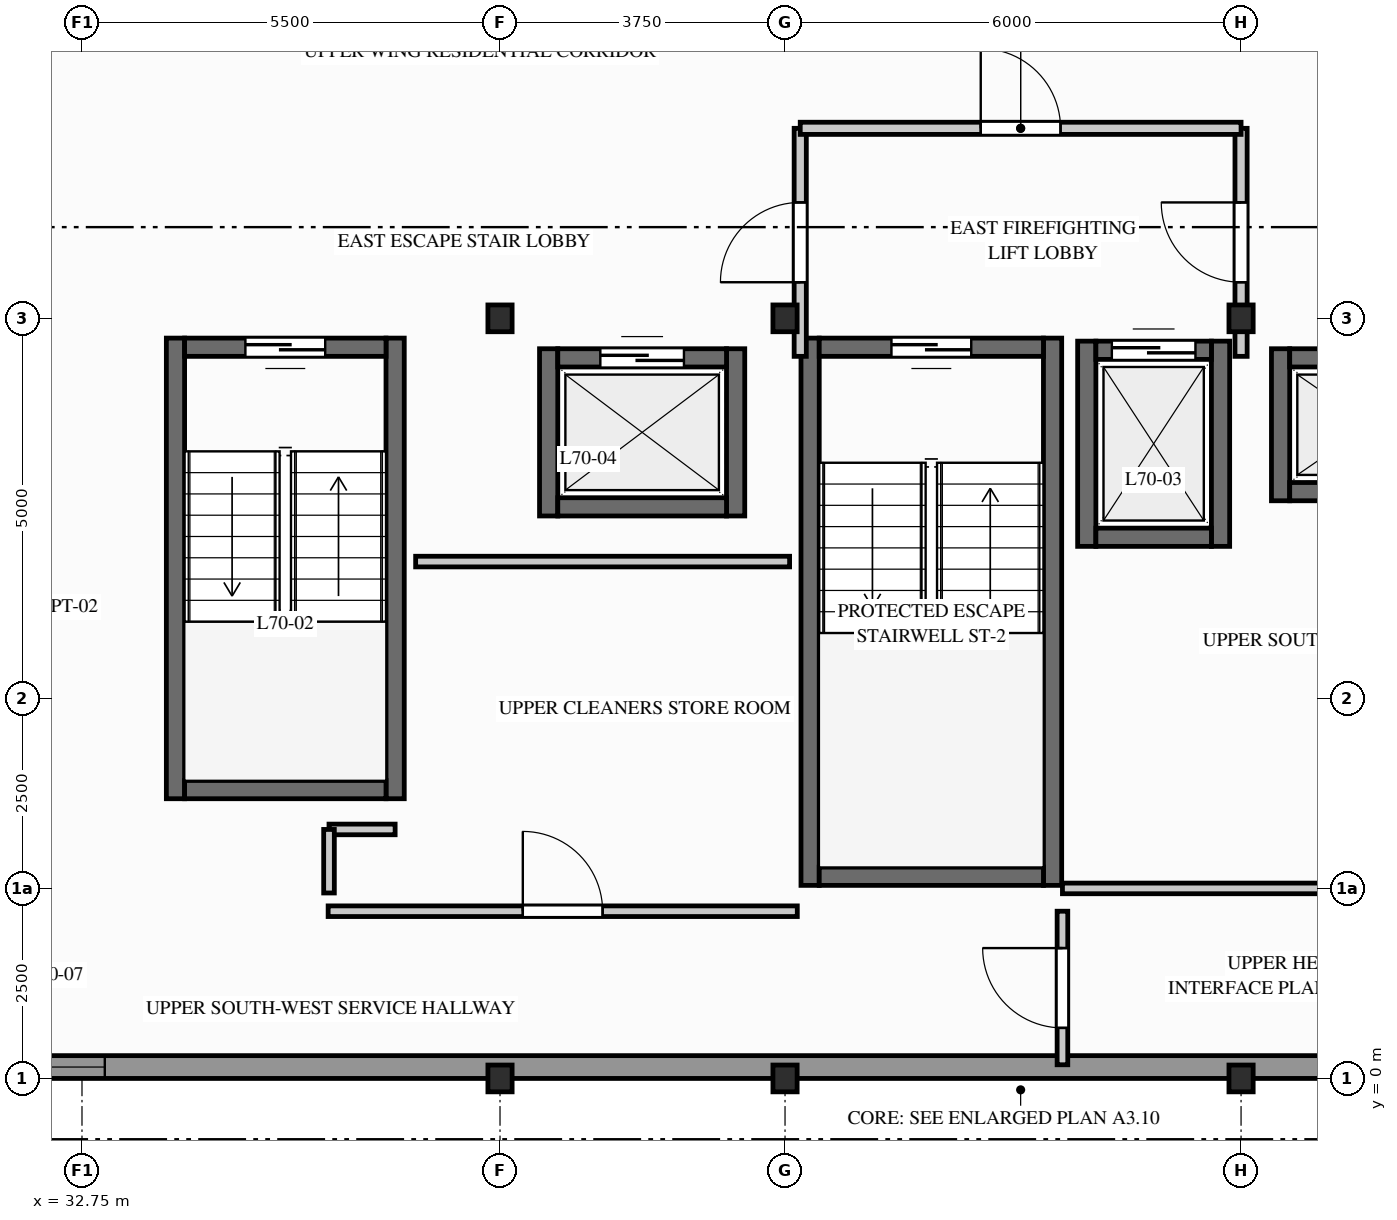
"""IFC4 building model, lengths in metres.
Left out: names, types, materials, properties, quantities, classifications, styles, units other than length and angle.
Written with IfcOpenShell. Run it as: python <this file> out.ifc"""

import sys

from ifc_helpers import new_model, si_unit, direction, frame, frame_2d, origin, origin_2d, place, context, subcontext, project, spatial, rectangle, i_section, extrude, element, fill, save


model = new_model("IFC4")
c1 = context("Model", 3, precision=1e-05, world=origin(), true_north=direction((0.0, 1.0)))
c2 = subcontext(c1, "Body", "Model", "MODEL_VIEW")
j1 = project(units=[si_unit("LENGTHUNIT", "METRE"), si_unit("PLANEANGLEUNIT", "RADIAN")], contexts=[c1])
p1 = place(None, origin())
s1 = spatial("IfcSite", under=j1, at=p1, CompositionType="ELEMENT")
p2 = place(p1, origin())
s2 = spatial("IfcBuilding", under=s1, at=p2, CompositionType="ELEMENT")
p3 = place(p2, frame((0.0, 0.0, 230.4)))
s3 = spatial("IfcBuildingStorey", under=s2, at=p3, CompositionType="ELEMENT", Elevation=230.4)
for number, where, z_axis, x_axis in (
    (1, (38.25, 0.0, 0.0), (0.0, 0.0, 1.0), (1.0, 0.0, 0.0)),
    (2, (38.25, 10.0, 0.0), (0.0, 0.0, 1.0), (1.0, 0.0, 0.0)),
    (3, (42.0, 0.0, 0.0), (0.0, 0.0, 1.0), (1.0, 0.0, 0.0)),
    (4, (42.0, 10.0, 0.0), (0.0, 0.0, 1.0), (1.0, 0.0, 0.0)),
    (5, (48.0, 0.0, 0.0), (0.0, 0.0, 1.0), (1.0, 0.0, 0.0)),
    (6, (48.0, 10.0, 0.0), (0.0, 0.0, 1.0), (1.0, 0.0, 0.0)),
):
    element("IfcColumn", number, at=place(p3, frame(where, z_axis=z_axis, x_axis=x_axis)), inside=s3, PredefinedType="COLUMN", context=c2, shape_type="SweptSolid", body=[
        extrude(i_section(OverallWidth=0.318, OverallDepth=0.353, WebThickness=0.023, FlangeThickness=0.038, FilletRadius=0.015, at=origin_2d()), origin(), (0.0, 0.0, 1.0), 3.1),
    ])
p4 = place(p3, frame((29.75, 0.15, 0.0), z_axis=(0.0, 0.0, 1.0), x_axis=(1.0, 0.0, 0.0)))
e7 = element("IfcWall", 7, at=p4, inside=s3, PredefinedType="STANDARD", context=c2, shape_type="SweptSolid", body=[
    extrude(rectangle(XDim=27.75, YDim=0.3, at=frame_2d((13.875, 0.0))), origin(), (0.0, 0.0, 1.0), 2.332),
])
p5 = place(p4, frame((2.5, 0.0, 0.712)))
e8 = element("IfcOpeningElement", 8, at=p5, cuts=e7, PredefinedType="OPENING", context=c2, shape_type="SweptSolid", body=[
    extrude(rectangle(XDim=0.8, YDim=1.4, at=frame_2d((0.4, 0.7))), frame((0.0, 0.16, 0.0), z_axis=(0.0, -1.0, 0.0), x_axis=(1.0, 0.0, 0.0)), (0.0, 0.0, 1.0), 0.32),
])
p6 = place(p4, frame((19.95, 0.0, 0.312)))
e9 = element("IfcOpeningElement", 9, at=p6, cuts=e7, PredefinedType="OPENING", context=c2, shape_type="SweptSolid", body=[
    extrude(rectangle(XDim=1.5, YDim=1.8, at=frame_2d((0.75, 0.9))), frame((0.0, 0.16, 0.0), z_axis=(0.0, -1.0, 0.0), x_axis=(1.0, 0.0, 0.0)), (0.0, 0.0, 1.0), 0.32),
])
for number, where, z_axis, x_axis in (
    (10, (42.33, 2.54, 0.0), (0.0, 0.0, 1.0), (0.0, 1.0, 0.0)),
    (11, (45.52, 2.54, 0.0), (0.0, 0.0, 1.0), (0.0, 1.0, 0.0)),
):
    element("IfcWall", number, at=place(p3, frame(where, z_axis=z_axis, x_axis=x_axis)), inside=s3, PredefinedType="SHEAR", context=c2, shape_type="SweptSolid", body=[
        extrude(rectangle(XDim=7.2, YDim=0.24, at=frame_2d((3.6, 0.0))), origin(), (0.0, 0.0, 1.0), 2.89),
    ])
p7 = place(p3, frame((42.45, 2.66, 0.0), z_axis=(0.0, 0.0, 1.0), x_axis=(1.0, 0.0, 0.0)))
e12 = element("IfcWall", 12, at=p7, inside=s3, PredefinedType="SHEAR", context=c2, shape_type="SweptSolid", body=[
    extrude(rectangle(XDim=2.95, YDim=0.24, at=frame_2d((1.475, 0.0))), origin(), (0.0, 0.0, 1.0), 2.89),
])
p8 = place(p3, frame((45.4, 9.62, 0.0), z_axis=(0.0, 0.0, 1.0), x_axis=(-1.0, 0.0, 0.0)))
e13 = element("IfcWall", 13, at=p8, inside=s3, PredefinedType="SHEAR", context=c2, shape_type="SweptSolid", body=[
    extrude(rectangle(XDim=2.95, YDim=0.24, at=frame_2d((1.475, 0.0))), origin(), (0.0, 0.0, 1.0), 2.89),
])
p9 = place(p8, frame((0.95, 0.0, 0.0)))
e14 = element("IfcOpeningElement", 14, at=p9, cuts=e13, PredefinedType="OPENING", context=c2, shape_type="SweptSolid", body=[
    extrude(rectangle(XDim=1.05, YDim=2.06, at=frame_2d((0.525, 1.03))), frame((0.0, 0.13, 0.0), z_axis=(0.0, -1.0, 0.0), x_axis=(1.0, 0.0, 0.0)), (0.0, 0.0, 1.0), 0.26),
])
for number, where, z_axis, x_axis in (
    (15, (33.98, 3.68, 0.0), (0.0, 0.0, 1.0), (0.0, 1.0, 0.0)),
    (16, (36.87, 3.68, 0.0), (0.0, 0.0, 1.0), (0.0, 1.0, 0.0)),
):
    element("IfcWall", number, at=place(p3, frame(where, z_axis=z_axis, x_axis=x_axis)), inside=s3, PredefinedType="SHEAR", context=c2, shape_type="SweptSolid", body=[
        extrude(rectangle(XDim=6.06, YDim=0.24, at=frame_2d((3.03, 0.0))), origin(), (0.0, 0.0, 1.0), 2.89),
    ])
p10 = place(p3, frame((34.1, 3.8, 0.0), z_axis=(0.0, 0.0, 1.0), x_axis=(1.0, 0.0, 0.0)))
e17 = element("IfcWall", 17, at=p10, inside=s3, PredefinedType="SHEAR", context=c2, shape_type="SweptSolid", body=[
    extrude(rectangle(XDim=2.65, YDim=0.24, at=frame_2d((1.325, 0.0))), origin(), (0.0, 0.0, 1.0), 2.89),
])
p11 = place(p3, frame((36.75, 9.62, 0.0), z_axis=(0.0, 0.0, 1.0), x_axis=(-1.0, 0.0, 0.0)))
e18 = element("IfcWall", 18, at=p11, inside=s3, PredefinedType="SHEAR", context=c2, shape_type="SweptSolid", body=[
    extrude(rectangle(XDim=2.65, YDim=0.24, at=frame_2d((1.325, 0.0))), origin(), (0.0, 0.0, 1.0), 2.89),
])
p12 = place(p11, frame((0.8, 0.0, 0.0)))
e19 = element("IfcOpeningElement", 19, at=p12, cuts=e18, PredefinedType="OPENING", context=c2, shape_type="SweptSolid", body=[
    extrude(rectangle(XDim=1.05, YDim=2.06, at=frame_2d((0.525, 1.03))), frame((0.0, 0.13, 0.0), z_axis=(0.0, -1.0, 0.0), x_axis=(1.0, 0.0, 0.0)), (0.0, 0.0, 1.0), 0.26),
])
for number, where, z_axis, x_axis in (
    (20, (45.97, 7.0, 0.0), (0.0, 0.0, 1.0), (0.0, 1.0, 0.0)),
    (21, (47.73, 7.0, 0.0), (0.0, 0.0, 1.0), (0.0, 1.0, 0.0)),
):
    element("IfcWall", number, at=place(p3, frame(where, z_axis=z_axis, x_axis=x_axis)), inside=s3, PredefinedType="SHEAR", context=c2, shape_type="SweptSolid", body=[
        extrude(rectangle(XDim=2.7, YDim=0.24, at=frame_2d((1.35, 0.0))), origin(), (0.0, 0.0, 1.0), 2.89),
    ])
p13 = place(p3, frame((46.09, 7.12, 0.0), z_axis=(0.0, 0.0, 1.0), x_axis=(1.0, 0.0, 0.0)))
e22 = element("IfcWall", 22, at=p13, inside=s3, PredefinedType="SHEAR", context=c2, shape_type="SweptSolid", body=[
    extrude(rectangle(XDim=1.52, YDim=0.24, at=frame_2d((0.76, 0.0))), origin(), (0.0, 0.0, 1.0), 2.89),
])
p14 = place(p3, frame((46.09, 9.58, 0.0), z_axis=(0.0, 0.0, 1.0), x_axis=(1.0, 0.0, 0.0)))
e23 = element("IfcWall", 23, at=p14, inside=s3, PredefinedType="SHEAR", context=c2, shape_type="SweptSolid", body=[
    extrude(rectangle(XDim=1.52, YDim=0.24, at=frame_2d((0.76, 0.0))), origin(), (0.0, 0.0, 1.0), 2.89),
])
p15 = place(p14, frame((0.21, 0.0, 0.0)))
e24 = element("IfcOpeningElement", 24, at=p15, cuts=e23, PredefinedType="OPENING", context=c2, shape_type="SweptSolid", body=[
    extrude(rectangle(XDim=1.1, YDim=2.06, at=frame_2d((0.55, 1.03))), frame((0.0, 0.13, 0.0), z_axis=(0.0, -1.0, 0.0), x_axis=(1.0, 0.0, 0.0)), (0.0, 0.0, 1.0), 0.26),
])
for number, where, z_axis, x_axis in (
    (25, (38.89, 7.4, 0.0), (0.0, 0.0, 1.0), (0.0, 1.0, 0.0)),
    (26, (41.35, 7.4, 0.0), (0.0, 0.0, 1.0), (0.0, 1.0, 0.0)),
):
    element("IfcWall", number, at=place(p3, frame(where, z_axis=z_axis, x_axis=x_axis)), inside=s3, PredefinedType="SHEAR", context=c2, shape_type="SweptSolid", body=[
        extrude(rectangle(XDim=2.2, YDim=0.24, at=frame_2d((1.1, 0.0))), origin(), (0.0, 0.0, 1.0), 2.89),
    ])
p16 = place(p3, frame((39.01, 7.52, 0.0), z_axis=(0.0, 0.0, 1.0), x_axis=(1.0, 0.0, 0.0)))
e27 = element("IfcWall", 27, at=p16, inside=s3, PredefinedType="SHEAR", context=c2, shape_type="SweptSolid", body=[
    extrude(rectangle(XDim=2.22, YDim=0.24, at=frame_2d((1.11, 0.0))), origin(), (0.0, 0.0, 1.0), 2.89),
])
p17 = place(p3, frame((39.01, 9.48, 0.0), z_axis=(0.0, 0.0, 1.0), x_axis=(1.0, 0.0, 0.0)))
e28 = element("IfcWall", 28, at=p17, inside=s3, PredefinedType="SHEAR", context=c2, shape_type="SweptSolid", body=[
    extrude(rectangle(XDim=2.22, YDim=0.24, at=frame_2d((1.11, 0.0))), origin(), (0.0, 0.0, 1.0), 2.89),
])
p18 = place(p17, frame((0.56, 0.0, 0.0)))
e29 = element("IfcOpeningElement", 29, at=p18, cuts=e28, PredefinedType="OPENING", context=c2, shape_type="SweptSolid", body=[
    extrude(rectangle(XDim=1.1, YDim=2.06, at=frame_2d((0.55, 1.03))), frame((0.0, 0.13, 0.0), z_axis=(0.0, -1.0, 0.0), x_axis=(1.0, 0.0, 0.0)), (0.0, 0.0, 1.0), 0.26),
])
p19 = place(p3, frame((48.52, 7.6, 0.0), z_axis=(0.0, 0.0, 1.0), x_axis=(0.0, 1.0, 0.0)))
e30 = element("IfcWall", 30, at=p19, inside=s3, PredefinedType="SHEAR", context=c2, shape_type="SweptSolid", body=[
    extrude(rectangle(XDim=2.0, YDim=0.24, at=frame_2d((1.0, 0.0))), origin(), (0.0, 0.0, 1.0), 2.89),
])
p20 = place(p3, frame((48.64, 7.72, 0.0), z_axis=(0.0, 0.0, 1.0), x_axis=(1.0, 0.0, 0.0)))
e31 = element("IfcWall", 31, at=p20, inside=s3, PredefinedType="SHEAR", context=c2, shape_type="SweptSolid", body=[
    extrude(rectangle(XDim=2.12, YDim=0.24, at=frame_2d((1.06, 0.0))), origin(), (0.0, 0.0, 1.0), 2.89),
])
p21 = place(p3, frame((48.64, 9.48, 0.0), z_axis=(0.0, 0.0, 1.0), x_axis=(1.0, 0.0, 0.0)))
e32 = element("IfcWall", 32, at=p21, inside=s3, PredefinedType="SHEAR", context=c2, shape_type="SweptSolid", body=[
    extrude(rectangle(XDim=2.12, YDim=0.24, at=frame_2d((1.06, 0.0))), origin(), (0.0, 0.0, 1.0), 2.89),
])
p22 = place(p21, frame((0.51, 0.0, 0.0)))
e33 = element("IfcOpeningElement", 33, at=p22, cuts=e32, PredefinedType="OPENING", context=c2, shape_type="SweptSolid", body=[
    extrude(rectangle(XDim=1.1, YDim=2.06, at=frame_2d((0.55, 1.03))), frame((0.0, 0.13, 0.0), z_axis=(0.0, -1.0, 0.0), x_axis=(1.0, 0.0, 0.0)), (0.0, 0.0, 1.0), 0.26),
])
p23 = place(p3, frame((35.989, 2.2, 0.0), z_axis=(0.0, 0.0, 1.0), x_axis=(1.0, 0.0, 0.0)))
e34 = element("IfcWall", 34, at=p23, inside=s3, PredefinedType="PARTITIONING", context=c2, shape_type="SweptSolid", body=[
    extrude(rectangle(XDim=6.173, YDim=0.14, at=frame_2d((3.086, 0.0))), origin(), (0.0, 0.0, 1.0), 2.326),
])
p24 = place(p23, frame((2.561, 0.0, 0.0)))
e35 = element("IfcOpeningElement", 35, at=p24, cuts=e34, PredefinedType="OPENING", context=c2, shape_type="SweptSolid", body=[
    extrude(rectangle(XDim=1.05, YDim=2.06, at=frame_2d((0.525, 1.03))), frame((0.0, 0.08, 0.0), z_axis=(0.0, -1.0, 0.0), x_axis=(1.0, 0.0, 0.0)), (0.0, 0.0, 1.0), 0.16),
])
p25 = place(p3, frame((45.65, 0.18, 0.0), z_axis=(0.0, 0.0, 1.0), x_axis=(0.0, 1.0, 0.0)))
e36 = element("IfcWall", 36, at=p25, inside=s3, PredefinedType="PARTITIONING", context=c2, shape_type="SweptSolid", body=[
    extrude(rectangle(XDim=2.02, YDim=0.14, at=frame_2d((1.01, 0.0))), origin(), (0.0, 0.0, 1.0), 2.89),
])
p26 = place(p25, frame((0.485, 0.0, 0.0)))
e37 = element("IfcOpeningElement", 37, at=p26, cuts=e36, PredefinedType="OPENING", context=c2, shape_type="SweptSolid", body=[
    extrude(rectangle(XDim=1.05, YDim=2.06, at=frame_2d((0.525, 1.03))), frame((0.0, 0.08, 0.0), z_axis=(0.0, -1.0, 0.0), x_axis=(1.0, 0.0, 0.0)), (0.0, 0.0, 1.0), 0.16),
])
p27 = place(p3, frame((45.65, 2.5, 0.0), z_axis=(0.0, 0.0, 1.0), x_axis=(1.0, 0.0, 0.0)))
e38 = element("IfcWall", 38, at=p27, inside=s3, PredefinedType="PARTITIONING", context=c2, shape_type="SweptSolid", body=[
    extrude(rectangle(XDim=5.761, YDim=0.14, at=frame_2d((2.881, 0.0))), origin(), (0.0, 0.0, 1.0), 2.326),
])
p28 = place(p3, frame((42.2, 9.5, 0.0), z_axis=(0.0, 0.0, 1.0), x_axis=(0.0, 1.0, 0.0)))
e39 = element("IfcWall", 39, at=p28, inside=s3, PredefinedType="PARTITIONING", context=c2, shape_type="SweptSolid", body=[
    extrude(rectangle(XDim=3.0, YDim=0.16, at=frame_2d((1.5, 0.0))), origin(), (0.0, 0.0, 1.0), 2.326),
])
p29 = place(p28, frame((0.975, 0.0, 0.0)))
e40 = element("IfcOpeningElement", 40, at=p29, cuts=e39, PredefinedType="OPENING", context=c2, shape_type="SweptSolid", body=[
    extrude(rectangle(XDim=1.05, YDim=2.06, at=frame_2d((0.525, 1.03))), frame((0.0, 0.09, 0.0), z_axis=(0.0, -1.0, 0.0), x_axis=(1.0, 0.0, 0.0)), (0.0, 0.0, 1.0), 0.18),
])
p30 = place(p3, frame((48.0, 9.5, 0.0), z_axis=(0.0, 0.0, 1.0), x_axis=(0.0, 1.0, 0.0)))
e41 = element("IfcWall", 41, at=p30, inside=s3, PredefinedType="PARTITIONING", context=c2, shape_type="SweptSolid", body=[
    extrude(rectangle(XDim=3.0, YDim=0.16, at=frame_2d((1.5, 0.0))), origin(), (0.0, 0.0, 1.0), 2.326),
])
p31 = place(p30, frame((0.975, 0.0, 0.0)))
e42 = element("IfcOpeningElement", 42, at=p31, cuts=e41, PredefinedType="OPENING", context=c2, shape_type="SweptSolid", body=[
    extrude(rectangle(XDim=1.05, YDim=2.06, at=frame_2d((0.525, 1.03))), frame((0.0, 0.09, 0.0), z_axis=(0.0, -1.0, 0.0), x_axis=(1.0, 0.0, 0.0)), (0.0, 0.0, 1.0), 0.18),
])
p32 = place(p3, frame((42.2, 12.5, 0.0), z_axis=(0.0, 0.0, 1.0), x_axis=(1.0, 0.0, 0.0)))
e43 = element("IfcWall", 43, at=p32, inside=s3, PredefinedType="PARTITIONING", context=c2, shape_type="SweptSolid", body=[
    extrude(rectangle(XDim=5.8, YDim=0.16, at=frame_2d((2.9, 0.0))), origin(), (0.0, 0.0, 1.0), 2.326),
])
p33 = place(p32, frame((2.375, 0.0, 0.0)))
e44 = element("IfcOpeningElement", 44, at=p33, cuts=e43, PredefinedType="OPENING", context=c2, shape_type="SweptSolid", body=[
    extrude(rectangle(XDim=1.05, YDim=2.06, at=frame_2d((0.525, 1.03))), frame((0.0, 0.09, 0.0), z_axis=(0.0, -1.0, 0.0), x_axis=(1.0, 0.0, 0.0)), (0.0, 0.0, 1.0), 0.18),
])
p34 = place(p3, frame((37.14, 6.8, 0.0), z_axis=(0.0, 0.0, 1.0), x_axis=(1.0, 0.0, 0.0)))
e45 = element("IfcWall", 45, at=p34, inside=s3, PredefinedType="PARTITIONING", context=c2, shape_type="SweptSolid", body=[
    extrude(rectangle(XDim=4.92, YDim=0.14, at=frame_2d((2.46, 0.0))), origin(), (0.0, 0.0, 1.0), 2.326),
])
p35 = place(p3, frame((36.0, 3.276, 0.0), z_axis=(0.0, 0.0, 1.0), x_axis=(1.0, 0.0, 0.0)))
e46 = element("IfcWall", 46, at=p35, inside=s3, PredefinedType="PARTITIONING", context=c2, shape_type="SweptSolid", body=[
    extrude(rectangle(XDim=0.87, YDim=0.14, at=frame_2d((0.435, 0.0))), origin(), (0.0, 0.0, 1.0), 2.89),
])
p36 = place(p3, frame((36.0, 2.44, 0.0), z_axis=(0.0, 0.0, 1.0), x_axis=(0.0, 1.0, 0.0)))
e47 = element("IfcWall", 47, at=p36, inside=s3, PredefinedType="PARTITIONING", context=c2, shape_type="SweptSolid", body=[
    extrude(rectangle(XDim=0.836, YDim=0.14, at=frame_2d((0.418, 0.0))), origin(), (0.0, 0.0, 1.0), 2.89),
])
p37 = place(p5, origin())
e48 = element("IfcWindow", 48, at=p37, inside=s3, PartitioningType="SINGLE_PANEL", PredefinedType="WINDOW", context=c2, shape_type="SweptSolid", body=[
    extrude(rectangle(XDim=0.8, YDim=1.4, at=frame_2d((0.4, 0.7))), frame((0.0, 0.03, 0.0), z_axis=(0.0, -1.0, 0.0), x_axis=(1.0, 0.0, 0.0)), (0.0, 0.0, 1.0), 0.06),
])
fill(e8, e48)
p38 = place(p9, origin())
e49 = element("IfcDoor", 49, at=p38, inside=s3, OperationType="SINGLE_SWING_LEFT", PredefinedType="DOOR", context=c2, shape_type="SweptSolid", body=[
    extrude(rectangle(XDim=1.05, YDim=2.06, at=frame_2d((0.525, 1.03))), frame((0.0, 0.025, 0.0), z_axis=(0.0, -1.0, 0.0), x_axis=(1.0, 0.0, 0.0)), (0.0, 0.0, 1.0), 0.05),
])
fill(e14, e49)
p39 = place(p12, origin())
e50 = element("IfcDoor", 50, at=p39, inside=s3, OperationType="SINGLE_SWING_LEFT", PredefinedType="DOOR", context=c2, shape_type="SweptSolid", body=[
    extrude(rectangle(XDim=1.05, YDim=2.06, at=frame_2d((0.525, 1.03))), frame((0.0, 0.025, 0.0), z_axis=(0.0, -1.0, 0.0), x_axis=(1.0, 0.0, 0.0)), (0.0, 0.0, 1.0), 0.05),
])
fill(e19, e50)
p40 = place(p15, origin())
e51 = element("IfcDoor", 51, at=p40, inside=s3, OperationType="SLIDING_TO_LEFT", PredefinedType="DOOR", context=c2, shape_type="SweptSolid", body=[
    extrude(rectangle(XDim=1.1, YDim=2.06, at=frame_2d((0.55, 1.03))), frame((0.0, 0.025, 0.0), z_axis=(0.0, -1.0, 0.0), x_axis=(1.0, 0.0, 0.0)), (0.0, 0.0, 1.0), 0.05),
])
fill(e24, e51)
p41 = place(p18, origin())
e52 = element("IfcDoor", 52, at=p41, inside=s3, OperationType="SLIDING_TO_RIGHT", PredefinedType="DOOR", context=c2, shape_type="SweptSolid", body=[
    extrude(rectangle(XDim=1.1, YDim=2.06, at=frame_2d((0.55, 1.03))), frame((0.0, 0.025, 0.0), z_axis=(0.0, -1.0, 0.0), x_axis=(1.0, 0.0, 0.0)), (0.0, 0.0, 1.0), 0.05),
])
fill(e29, e52)
p42 = place(p24, origin())
e53 = element("IfcDoor", 53, at=p42, inside=s3, OperationType="SINGLE_SWING_LEFT", PredefinedType="DOOR", context=c2, shape_type="SweptSolid", body=[
    extrude(rectangle(XDim=1.05, YDim=2.06, at=frame_2d((0.525, 1.03))), frame((0.0, 0.025, 0.0), z_axis=(0.0, -1.0, 0.0), x_axis=(1.0, 0.0, 0.0)), (0.0, 0.0, 1.0), 0.05),
])
fill(e35, e53)
p43 = place(p26, origin())
e54 = element("IfcDoor", 54, at=p43, inside=s3, OperationType="SINGLE_SWING_RIGHT", PredefinedType="DOOR", context=c2, shape_type="SweptSolid", body=[
    extrude(rectangle(XDim=1.05, YDim=2.06, at=frame_2d((0.525, 1.03))), frame((0.0, 0.025, 0.0), z_axis=(0.0, -1.0, 0.0), x_axis=(1.0, 0.0, 0.0)), (0.0, 0.0, 1.0), 0.05),
])
fill(e37, e54)
p44 = place(p29, origin())
e55 = element("IfcDoor", 55, at=p44, inside=s3, OperationType="SINGLE_SWING_LEFT", PredefinedType="DOOR", context=c2, shape_type="SweptSolid", body=[
    extrude(rectangle(XDim=1.05, YDim=2.06, at=frame_2d((0.525, 1.03))), frame((0.0, 0.025, 0.0), z_axis=(0.0, -1.0, 0.0), x_axis=(1.0, 0.0, 0.0)), (0.0, 0.0, 1.0), 0.05),
])
fill(e40, e55)
p45 = place(p31, origin())
e56 = element("IfcDoor", 56, at=p45, inside=s3, OperationType="SINGLE_SWING_RIGHT", PredefinedType="DOOR", context=c2, shape_type="SweptSolid", body=[
    extrude(rectangle(XDim=1.05, YDim=2.06, at=frame_2d((0.525, 1.03))), frame((0.0, 0.025, 0.0), z_axis=(0.0, -1.0, 0.0), x_axis=(1.0, 0.0, 0.0)), (0.0, 0.0, 1.0), 0.05),
])
fill(e42, e56)
p46 = place(p33, origin())
e57 = element("IfcDoor", 57, at=p46, inside=s3, OperationType="SINGLE_SWING_LEFT", PredefinedType="DOOR", context=c2, shape_type="SweptSolid", body=[
    extrude(rectangle(XDim=1.05, YDim=2.06, at=frame_2d((0.525, 1.03))), frame((0.0, 0.025, 0.0), z_axis=(0.0, -1.0, 0.0), x_axis=(1.0, 0.0, 0.0)), (0.0, 0.0, 1.0), 0.05),
])
fill(e44, e57)
save(model, sys.argv[1])
